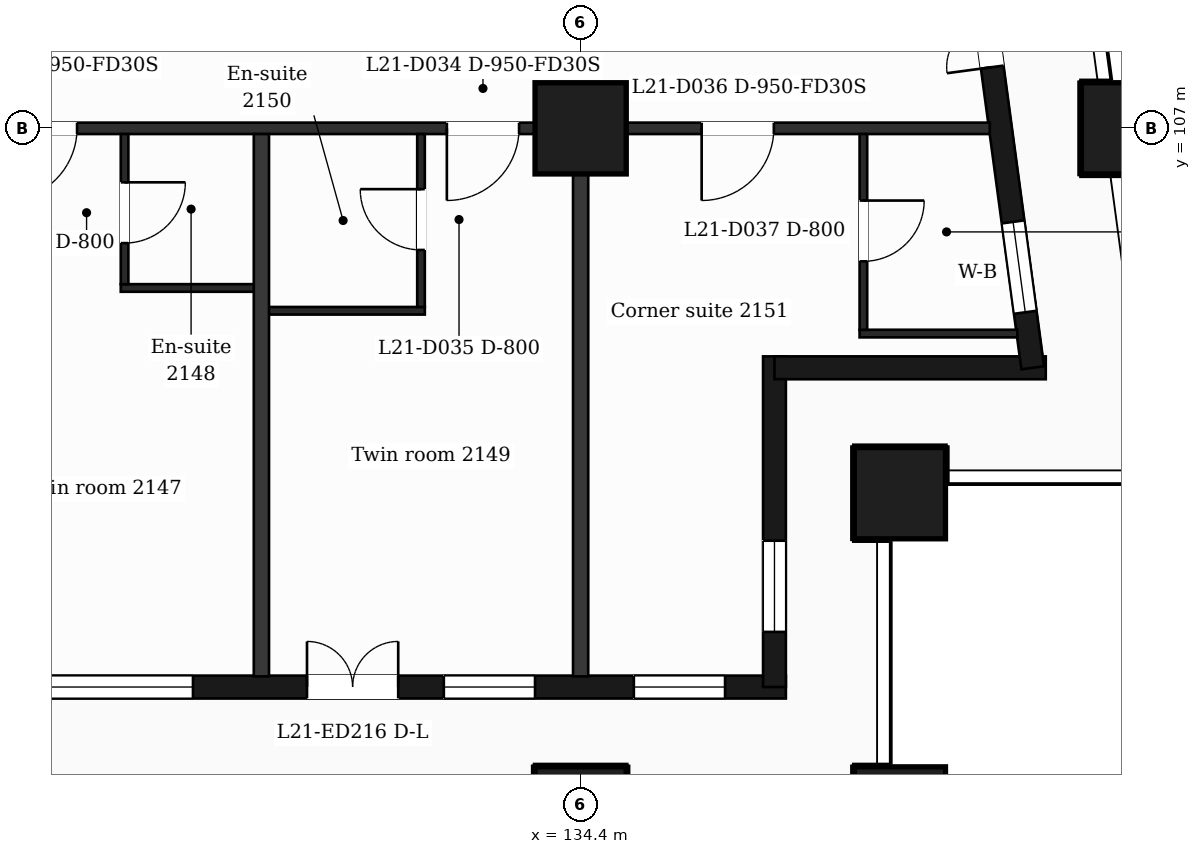
"""IFC4 building model, lengths in metres.
Left out: names, types, materials, properties, quantities, classifications, styles, units other than length and angle.
Written with IfcOpenShell. Run it as: python <this file> out.ifc"""

import sys

from ifc_helpers import new_model, si_unit, direction, frame, frame_2d, origin, origin_2d, place, context, subcontext, project, spatial, rectangle, extrude, element, fill, save


model = new_model("IFC4")
c1 = context("Model", 3, precision=1e-05, world=origin(), true_north=direction((0.0, 1.0)))
c2 = subcontext(c1, "Body", "Model", "MODEL_VIEW")
j1 = project(units=[si_unit("LENGTHUNIT", "METRE"), si_unit("PLANEANGLEUNIT", "RADIAN")], contexts=[c1])
p1 = place(None, origin())
s1 = spatial("IfcSite", under=j1, at=p1, CompositionType="ELEMENT")
p2 = place(p1, origin())
s2 = spatial("IfcBuilding", under=s1, at=p2, CompositionType="ELEMENT")
p3 = place(p2, frame((0.0, 0.0, 94.7)))
s3 = spatial("IfcBuildingStorey", under=s2, at=p3, CompositionType="ELEMENT", Elevation=94.7)
for number, where, z_axis, x_axis in (
    (1, (134.4, 98.0, 0.0), (0.0, 0.0, 1.0), (1.0, 0.0, 0.0)),
    (2, (138.6, 98.0, 0.0), (0.0, 0.0, 1.0), (1.0, 0.0, 0.0)),
    (3, (138.6, 102.2, 0.0), (0.0, 0.0, 1.0), (1.0, 0.0, 0.0)),
    (4, (134.4, 107.0, 0.0), (0.0, 0.0, 1.0), (1.0, 0.0, 0.0)),
    (5, (141.588, 107.0, 0.0), (0.0, 0.0, 1.0), (1.0, 0.0, 0.0)),
):
    element("IfcColumn", number, at=place(p3, frame(where, z_axis=z_axis, x_axis=x_axis)), inside=s3, PredefinedType="COLUMN", context=c2, shape_type="SweptSolid", body=[
        extrude(rectangle(XDim=1.2, YDim=1.2, at=origin_2d()), origin(), (0.0, 0.0, 1.0), 3.7),
    ])
p4 = place(p3, frame((89.85, 99.65, 0.0), z_axis=(0.0, 0.0, 1.0), x_axis=(1.0, 0.0, 0.0)))
e6 = element("IfcWall", 6, at=p4, inside=s3, PredefinedType="SOLIDWALL", context=c2, shape_type="SweptSolid", body=[
    extrude(rectangle(XDim=47.25, YDim=0.3, at=frame_2d((23.625, 0.0))), origin(), (0.0, 0.0, 1.0), 3.38),
])
p5 = place(p4, frame((0.725, 0.0, 0.9)))
e7 = element("IfcOpeningElement", 7, at=p5, cuts=e6, PredefinedType="OPENING", context=c2, shape_type="SweptSolid", body=[
    extrude(rectangle(XDim=1.2, YDim=2.1, at=frame_2d((0.6, 1.05))), frame((0.0, 0.16, 0.0), z_axis=(0.0, -1.0, 0.0), x_axis=(1.0, 0.0, 0.0)), (0.0, 0.0, 1.0), 0.32),
])
p6 = place(p4, frame((3.45, 0.0, 0.9)))
e8 = element("IfcOpeningElement", 8, at=p6, cuts=e6, PredefinedType="OPENING", context=c2, shape_type="SweptSolid", body=[
    extrude(rectangle(XDim=2.4, YDim=2.1, at=frame_2d((1.2, 1.05))), frame((0.0, 0.16, 0.0), z_axis=(0.0, -1.0, 0.0), x_axis=(1.0, 0.0, 0.0)), (0.0, 0.0, 1.0), 0.32),
])
p7 = place(p4, frame((7.65, 0.0, 0.9)))
e9 = element("IfcOpeningElement", 9, at=p7, cuts=e6, PredefinedType="OPENING", context=c2, shape_type="SweptSolid", body=[
    extrude(rectangle(XDim=2.4, YDim=2.1, at=frame_2d((1.2, 1.05))), frame((0.0, 0.16, 0.0), z_axis=(0.0, -1.0, 0.0), x_axis=(1.0, 0.0, 0.0)), (0.0, 0.0, 1.0), 0.32),
])
p8 = place(p4, frame((11.85, 0.0, 0.9)))
e10 = element("IfcOpeningElement", 10, at=p8, cuts=e6, PredefinedType="OPENING", context=c2, shape_type="SweptSolid", body=[
    extrude(rectangle(XDim=2.4, YDim=2.1, at=frame_2d((1.2, 1.05))), frame((0.0, 0.16, 0.0), z_axis=(0.0, -1.0, 0.0), x_axis=(1.0, 0.0, 0.0)), (0.0, 0.0, 1.0), 0.32),
])
p9 = place(p4, frame((16.05, 0.0, 0.9)))
e11 = element("IfcOpeningElement", 11, at=p9, cuts=e6, PredefinedType="OPENING", context=c2, shape_type="SweptSolid", body=[
    extrude(rectangle(XDim=2.4, YDim=2.1, at=frame_2d((1.2, 1.05))), frame((0.0, 0.16, 0.0), z_axis=(0.0, -1.0, 0.0), x_axis=(1.0, 0.0, 0.0)), (0.0, 0.0, 1.0), 0.32),
])
p10 = place(p4, frame((20.25, 0.0, 0.9)))
e12 = element("IfcOpeningElement", 12, at=p10, cuts=e6, PredefinedType="OPENING", context=c2, shape_type="SweptSolid", body=[
    extrude(rectangle(XDim=2.4, YDim=2.1, at=frame_2d((1.2, 1.05))), frame((0.0, 0.16, 0.0), z_axis=(0.0, -1.0, 0.0), x_axis=(1.0, 0.0, 0.0)), (0.0, 0.0, 1.0), 0.32),
])
p11 = place(p4, frame((25.05, 0.0, 0.9)))
e13 = element("IfcOpeningElement", 13, at=p11, cuts=e6, PredefinedType="OPENING", context=c2, shape_type="SweptSolid", body=[
    extrude(rectangle(XDim=1.2, YDim=2.1, at=frame_2d((0.6, 1.05))), frame((0.0, 0.16, 0.0), z_axis=(0.0, -1.0, 0.0), x_axis=(1.0, 0.0, 0.0)), (0.0, 0.0, 1.0), 0.32),
])
p12 = place(p4, frame((29.25, 0.0, 0.9)))
e14 = element("IfcOpeningElement", 14, at=p12, cuts=e6, PredefinedType="OPENING", context=c2, shape_type="SweptSolid", body=[
    extrude(rectangle(XDim=1.2, YDim=2.1, at=frame_2d((0.6, 1.05))), frame((0.0, 0.16, 0.0), z_axis=(0.0, -1.0, 0.0), x_axis=(1.0, 0.0, 0.0)), (0.0, 0.0, 1.0), 0.32),
])
p13 = place(p4, frame((32.55, 0.0, 0.0)))
e15 = element("IfcOpeningElement", 15, at=p13, cuts=e6, PredefinedType="OPENING", context=c2, shape_type="SweptSolid", body=[
    extrude(rectangle(XDim=1.2, YDim=2.4, at=frame_2d((0.6, 1.2))), frame((0.0, 0.16, 0.0), z_axis=(0.0, -1.0, 0.0), x_axis=(1.0, 0.0, 0.0)), (0.0, 0.0, 1.0), 0.32),
])
p14 = place(p4, frame((34.35, 0.0, 0.9)))
e16 = element("IfcOpeningElement", 16, at=p14, cuts=e6, PredefinedType="OPENING", context=c2, shape_type="SweptSolid", body=[
    extrude(rectangle(XDim=1.2, YDim=2.1, at=frame_2d((0.6, 1.05))), frame((0.0, 0.16, 0.0), z_axis=(0.0, -1.0, 0.0), x_axis=(1.0, 0.0, 0.0)), (0.0, 0.0, 1.0), 0.32),
])
p15 = place(p4, frame((37.05, 0.0, 0.9)))
e17 = element("IfcOpeningElement", 17, at=p15, cuts=e6, PredefinedType="OPENING", context=c2, shape_type="SweptSolid", body=[
    extrude(rectangle(XDim=2.4, YDim=2.1, at=frame_2d((1.2, 1.05))), frame((0.0, 0.16, 0.0), z_axis=(0.0, -1.0, 0.0), x_axis=(1.0, 0.0, 0.0)), (0.0, 0.0, 1.0), 0.32),
])
p16 = place(p4, frame((40.95, 0.0, 0.0)))
e18 = element("IfcOpeningElement", 18, at=p16, cuts=e6, PredefinedType="OPENING", context=c2, shape_type="SweptSolid", body=[
    extrude(rectangle(XDim=1.2, YDim=2.4, at=frame_2d((0.6, 1.2))), frame((0.0, 0.16, 0.0), z_axis=(0.0, -1.0, 0.0), x_axis=(1.0, 0.0, 0.0)), (0.0, 0.0, 1.0), 0.32),
])
p17 = place(p4, frame((42.75, 0.0, 0.9)))
e19 = element("IfcOpeningElement", 19, at=p17, cuts=e6, PredefinedType="OPENING", context=c2, shape_type="SweptSolid", body=[
    extrude(rectangle(XDim=1.2, YDim=2.1, at=frame_2d((0.6, 1.05))), frame((0.0, 0.16, 0.0), z_axis=(0.0, -1.0, 0.0), x_axis=(1.0, 0.0, 0.0)), (0.0, 0.0, 1.0), 0.32),
])
p18 = place(p4, frame((45.25, 0.0, 0.9)))
e20 = element("IfcOpeningElement", 20, at=p18, cuts=e6, PredefinedType="OPENING", context=c2, shape_type="SweptSolid", body=[
    extrude(rectangle(XDim=1.2, YDim=2.1, at=frame_2d((0.6, 1.05))), frame((0.0, 0.16, 0.0), z_axis=(0.0, -1.0, 0.0), x_axis=(1.0, 0.0, 0.0)), (0.0, 0.0, 1.0), 0.32),
])
p19 = place(p3, frame((136.95, 99.65, 0.0), z_axis=(0.0, 0.0, 1.0), x_axis=(0.0, 1.0, 0.0)))
e21 = element("IfcWall", 21, at=p19, inside=s3, PredefinedType="SOLIDWALL", context=c2, shape_type="SweptSolid", body=[
    extrude(rectangle(XDim=4.35, YDim=0.3, at=frame_2d((2.175, 0.0))), origin(), (0.0, 0.0, 1.0), 3.38),
])
p20 = place(p19, frame((0.725, 0.0, 0.9)))
e22 = element("IfcOpeningElement", 22, at=p20, cuts=e21, PredefinedType="OPENING", context=c2, shape_type="SweptSolid", body=[
    extrude(rectangle(XDim=1.2, YDim=2.1, at=frame_2d((0.6, 1.05))), frame((0.0, 0.16, 0.0), z_axis=(0.0, -1.0, 0.0), x_axis=(1.0, 0.0, 0.0)), (0.0, 0.0, 1.0), 0.32),
])
p21 = place(p3, frame((136.95, 103.85, 0.0), z_axis=(0.0, 0.0, 1.0), x_axis=(1.0, 0.0, 0.0)))
e23 = element("IfcWall", 23, at=p21, inside=s3, PredefinedType="SOLIDWALL", context=c2, shape_type="SweptSolid", body=[
    extrude(rectangle(XDim=3.569, YDim=0.3, at=frame_2d((1.785, 0.0))), origin(), (0.0, 0.0, 1.0), 3.38),
])
p22 = place(p3, frame((140.348, 103.85, 0.0), z_axis=(0.0, 0.0, 1.0), x_axis=(-0.133431549479, 0.991058031401, 0.0)))
e24 = element("IfcWall", 24, at=p22, inside=s3, PredefinedType="SOLIDWALL", context=c2, shape_type="SweptSolid", body=[
    extrude(rectangle(XDim=6.609, YDim=0.3, at=frame_2d((3.304, 0.0))), origin(), (0.0, 0.0, 1.0), 3.38),
])
p23 = place(p22, frame((0.737, 0.0, 0.9)))
e25 = element("IfcOpeningElement", 25, at=p23, cuts=e24, PredefinedType="OPENING", context=c2, shape_type="SweptSolid", body=[
    extrude(rectangle(XDim=1.2, YDim=2.1, at=frame_2d((0.6, 1.05))), frame((0.0, 0.16, 0.0), z_axis=(0.0, -1.0, 0.0), x_axis=(1.0, 0.0, 0.0)), (0.0, 0.0, 1.0), 0.32),
])
p24 = place(p22, frame((3.991, 0.0, 0.0)))
e26 = element("IfcOpeningElement", 26, at=p24, cuts=e24, PredefinedType="OPENING", context=c2, shape_type="SweptSolid", body=[
    extrude(rectangle(XDim=1.2, YDim=2.4, at=frame_2d((0.6, 1.2))), frame((0.0, 0.16, 0.0), z_axis=(0.0, -1.0, 0.0), x_axis=(1.0, 0.0, 0.0)), (0.0, 0.0, 1.0), 0.32),
])
p25 = place(p3, frame((138.07, 104.3, 0.0), z_axis=(0.0, 0.0, 1.0), x_axis=(1.0, 0.0, 0.0)))
e27 = element("IfcWall", 27, at=p25, inside=s3, PredefinedType="PARTITIONING", context=c2, shape_type="SweptSolid", body=[
    extrude(rectangle(XDim=2.076, YDim=0.1, at=frame_2d((1.038, 0.0))), origin(), (0.0, 0.0, 1.0), 3.38),
])
p26 = place(p3, frame((130.2, 104.6, 0.0), z_axis=(0.0, 0.0, 1.0), x_axis=(1.0, 0.0, 0.0)))
e28 = element("IfcWall", 28, at=p26, inside=s3, PredefinedType="PARTITIONING", context=c2, shape_type="SweptSolid", body=[
    extrude(rectangle(XDim=2.15, YDim=0.1, at=frame_2d((1.075, 0.0))), origin(), (0.0, 0.0, 1.0), 3.38),
])
p27 = place(p3, frame((128.35, 104.9, 0.0), z_axis=(0.0, 0.0, 1.0), x_axis=(1.0, 0.0, 0.0)))
e29 = element("IfcWall", 29, at=p27, inside=s3, PredefinedType="PARTITIONING", context=c2, shape_type="SweptSolid", body=[
    extrude(rectangle(XDim=1.85, YDim=0.1, at=frame_2d((0.925, 0.0))), origin(), (0.0, 0.0, 1.0), 3.38),
])
p28 = place(p3, frame((87.018, 107.0, 0.0), z_axis=(0.0, 0.0, 1.0), x_axis=(1.0, 0.0, 0.0)))
e30 = element("IfcWall", 30, at=p28, inside=s3, PredefinedType="PARTITIONING", context=c2, shape_type="SweptSolid", body=[
    extrude(rectangle(XDim=52.765, YDim=0.15, at=frame_2d((26.382, 0.0))), origin(), (0.0, 0.0, 1.0), 3.38),
])
p29 = place(p28, frame((0.707, 0.0, 0.0)))
e31 = element("IfcOpeningElement", 31, at=p29, cuts=e30, PredefinedType="OPENING", context=c2, shape_type="SweptSolid", body=[
    extrude(rectangle(XDim=0.95, YDim=2.1, at=frame_2d((0.475, 1.05))), frame((0.0, 0.085, 0.0), z_axis=(0.0, -1.0, 0.0), x_axis=(1.0, 0.0, 0.0)), (0.0, 0.0, 1.0), 0.17),
])
p30 = place(p28, frame((6.982, 0.0, 0.0)))
e32 = element("IfcOpeningElement", 32, at=p30, cuts=e30, PredefinedType="OPENING", context=c2, shape_type="SweptSolid", body=[
    extrude(rectangle(XDim=1.0, YDim=2.1, at=frame_2d((0.5, 1.05))), frame((0.0, 0.085, 0.0), z_axis=(0.0, -1.0, 0.0), x_axis=(1.0, 0.0, 0.0)), (0.0, 0.0, 1.0), 0.17),
])
p31 = place(p28, frame((16.457, 0.0, 0.0)))
e33 = element("IfcOpeningElement", 33, at=p31, cuts=e30, PredefinedType="OPENING", context=c2, shape_type="SweptSolid", body=[
    extrude(rectangle(XDim=0.95, YDim=2.1, at=frame_2d((0.475, 1.05))), frame((0.0, 0.085, 0.0), z_axis=(0.0, -1.0, 0.0), x_axis=(1.0, 0.0, 0.0)), (0.0, 0.0, 1.0), 0.17),
])
p32 = place(p28, frame((18.445, 0.0, 0.0)))
e34 = element("IfcOpeningElement", 34, at=p32, cuts=e30, PredefinedType="OPENING", context=c2, shape_type="SweptSolid", body=[
    extrude(rectangle(XDim=0.95, YDim=2.1, at=frame_2d((0.475, 1.05))), frame((0.0, 0.085, 0.0), z_axis=(0.0, -1.0, 0.0), x_axis=(1.0, 0.0, 0.0)), (0.0, 0.0, 1.0), 0.17),
])
p33 = place(p28, frame((25.157, 0.0, 0.0)))
e35 = element("IfcOpeningElement", 35, at=p33, cuts=e30, PredefinedType="OPENING", context=c2, shape_type="SweptSolid", body=[
    extrude(rectangle(XDim=0.95, YDim=2.1, at=frame_2d((0.475, 1.05))), frame((0.0, 0.085, 0.0), z_axis=(0.0, -1.0, 0.0), x_axis=(1.0, 0.0, 0.0)), (0.0, 0.0, 1.0), 0.17),
])
p34 = place(p28, frame((27.07, 0.0, 0.0)))
e36 = element("IfcOpeningElement", 36, at=p34, cuts=e30, PredefinedType="OPENING", context=c2, shape_type="SweptSolid", body=[
    extrude(rectangle(XDim=0.95, YDim=2.1, at=frame_2d((0.475, 1.05))), frame((0.0, 0.085, 0.0), z_axis=(0.0, -1.0, 0.0), x_axis=(1.0, 0.0, 0.0)), (0.0, 0.0, 1.0), 0.17),
])
p35 = place(p28, frame((34.712, 0.0, 0.0)))
e37 = element("IfcOpeningElement", 37, at=p35, cuts=e30, PredefinedType="OPENING", context=c2, shape_type="SweptSolid", body=[
    extrude(rectangle(XDim=0.95, YDim=2.1, at=frame_2d((0.475, 1.05))), frame((0.0, 0.085, 0.0), z_axis=(0.0, -1.0, 0.0), x_axis=(1.0, 0.0, 0.0)), (0.0, 0.0, 1.0), 0.17),
])
p36 = place(p28, frame((39.807, 0.0, 0.0)))
e38 = element("IfcOpeningElement", 38, at=p36, cuts=e30, PredefinedType="OPENING", context=c2, shape_type="SweptSolid", body=[
    extrude(rectangle(XDim=0.95, YDim=2.1, at=frame_2d((0.475, 1.05))), frame((0.0, 0.085, 0.0), z_axis=(0.0, -1.0, 0.0), x_axis=(1.0, 0.0, 0.0)), (0.0, 0.0, 1.0), 0.17),
])
p37 = place(p28, frame((45.622, 0.0, 0.0)))
e39 = element("IfcOpeningElement", 39, at=p37, cuts=e30, PredefinedType="OPENING", context=c2, shape_type="SweptSolid", body=[
    extrude(rectangle(XDim=0.95, YDim=2.1, at=frame_2d((0.475, 1.05))), frame((0.0, 0.085, 0.0), z_axis=(0.0, -1.0, 0.0), x_axis=(1.0, 0.0, 0.0)), (0.0, 0.0, 1.0), 0.17),
])
p38 = place(p28, frame((48.974, 0.0, 0.0)))
e40 = element("IfcOpeningElement", 40, at=p38, cuts=e30, PredefinedType="OPENING", context=c2, shape_type="SweptSolid", body=[
    extrude(rectangle(XDim=0.95, YDim=2.1, at=frame_2d((0.475, 1.05))), frame((0.0, 0.085, 0.0), z_axis=(0.0, -1.0, 0.0), x_axis=(1.0, 0.0, 0.0)), (0.0, 0.0, 1.0), 0.17),
])
p39 = place(p3, frame((128.4, 104.95, 0.0), z_axis=(0.0, 0.0, 1.0), x_axis=(0.0, 1.0, 0.0)))
e41 = element("IfcWall", 41, at=p39, inside=s3, PredefinedType="PARTITIONING", context=c2, shape_type="SweptSolid", body=[
    extrude(rectangle(XDim=1.975, YDim=0.1, at=frame_2d((0.988, 0.0))), origin(), (0.0, 0.0, 1.0), 3.38),
])
p40 = place(p39, frame((0.54, 0.0, 0.0)))
e42 = element("IfcOpeningElement", 42, at=p40, cuts=e41, PredefinedType="OPENING", context=c2, shape_type="SweptSolid", body=[
    extrude(rectangle(XDim=0.8, YDim=2.1, at=frame_2d((0.4, 1.05))), frame((0.0, 0.06, 0.0), z_axis=(0.0, -1.0, 0.0), x_axis=(1.0, 0.0, 0.0)), (0.0, 0.0, 1.0), 0.12),
])
p41 = place(p3, frame((130.2, 99.79, 0.0), z_axis=(0.0, 0.0, 1.0), x_axis=(0.0, 1.0, 0.0)))
e43 = element("IfcWall", 43, at=p41, inside=s3, PredefinedType="PARTITIONING", context=c2, shape_type="SweptSolid", body=[
    extrude(rectangle(XDim=7.135, YDim=0.2, at=frame_2d((3.567, 0.0))), origin(), (0.0, 0.0, 1.0), 3.38),
])
p42 = place(p3, frame((132.3, 104.65, 0.0), z_axis=(0.0, 0.0, 1.0), x_axis=(0.0, 1.0, 0.0)))
e44 = element("IfcWall", 44, at=p42, inside=s3, PredefinedType="PARTITIONING", context=c2, shape_type="SweptSolid", body=[
    extrude(rectangle(XDim=2.275, YDim=0.1, at=frame_2d((1.138, 0.0))), origin(), (0.0, 0.0, 1.0), 3.38),
])
p43 = place(p42, frame((0.75, 0.0, 0.0)))
e45 = element("IfcOpeningElement", 45, at=p43, cuts=e44, PredefinedType="OPENING", context=c2, shape_type="SweptSolid", body=[
    extrude(rectangle(XDim=0.8, YDim=2.1, at=frame_2d((0.4, 1.05))), frame((0.0, 0.06, 0.0), z_axis=(0.0, -1.0, 0.0), x_axis=(1.0, 0.0, 0.0)), (0.0, 0.0, 1.0), 0.12),
])
p44 = place(p3, frame((134.4, 99.79, 0.0), z_axis=(0.0, 0.0, 1.0), x_axis=(0.0, 1.0, 0.0)))
e46 = element("IfcWall", 46, at=p44, inside=s3, PredefinedType="PARTITIONING", context=c2, shape_type="SweptSolid", body=[
    extrude(rectangle(XDim=7.135, YDim=0.2, at=frame_2d((3.567, 0.0))), origin(), (0.0, 0.0, 1.0), 3.38),
])
p45 = place(p3, frame((138.12, 104.35, 0.0), z_axis=(0.0, 0.0, 1.0), x_axis=(0.0, 1.0, 0.0)))
e47 = element("IfcWall", 47, at=p45, inside=s3, PredefinedType="PARTITIONING", context=c2, shape_type="SweptSolid", body=[
    extrude(rectangle(XDim=2.575, YDim=0.1, at=frame_2d((1.288, 0.0))), origin(), (0.0, 0.0, 1.0), 3.38),
])
p46 = place(p45, frame((0.9, 0.0, 0.0)))
e48 = element("IfcOpeningElement", 48, at=p46, cuts=e47, PredefinedType="OPENING", context=c2, shape_type="SweptSolid", body=[
    extrude(rectangle(XDim=0.8, YDim=2.1, at=frame_2d((0.4, 1.05))), frame((0.0, 0.06, 0.0), z_axis=(0.0, -1.0, 0.0), x_axis=(1.0, 0.0, 0.0)), (0.0, 0.0, 1.0), 0.12),
])
p47 = place(p15, origin())
e49 = element("IfcWindow", 49, at=p47, inside=s3, PartitioningType="SINGLE_PANEL", PredefinedType="WINDOW", context=c2, shape_type="SweptSolid", body=[
    extrude(rectangle(XDim=2.4, YDim=2.1, at=frame_2d((1.2, 1.05))), frame((0.0, 0.03, 0.0), z_axis=(0.0, -1.0, 0.0), x_axis=(1.0, 0.0, 0.0)), (0.0, 0.0, 1.0), 0.06),
])
fill(e17, e49)
p48 = place(p16, origin())
e50 = element("IfcDoor", 50, at=p48, inside=s3, OperationType="DOUBLE_DOOR_SINGLE_SWING", PredefinedType="DOOR", context=c2, shape_type="SweptSolid", body=[
    extrude(rectangle(XDim=1.2, YDim=2.4, at=frame_2d((0.6, 1.2))), frame((0.0, 0.025, 0.0), z_axis=(0.0, -1.0, 0.0), x_axis=(1.0, 0.0, 0.0)), (0.0, 0.0, 1.0), 0.05),
])
fill(e18, e50)
p49 = place(p17, origin())
e51 = element("IfcWindow", 51, at=p49, inside=s3, PartitioningType="SINGLE_PANEL", PredefinedType="WINDOW", context=c2, shape_type="SweptSolid", body=[
    extrude(rectangle(XDim=1.2, YDim=2.1, at=frame_2d((0.6, 1.05))), frame((0.0, 0.03, 0.0), z_axis=(0.0, -1.0, 0.0), x_axis=(1.0, 0.0, 0.0)), (0.0, 0.0, 1.0), 0.06),
])
fill(e19, e51)
p50 = place(p18, origin())
e52 = element("IfcWindow", 52, at=p50, inside=s3, PartitioningType="SINGLE_PANEL", PredefinedType="WINDOW", context=c2, shape_type="SweptSolid", body=[
    extrude(rectangle(XDim=1.2, YDim=2.1, at=frame_2d((0.6, 1.05))), frame((0.0, 0.03, 0.0), z_axis=(0.0, -1.0, 0.0), x_axis=(1.0, 0.0, 0.0)), (0.0, 0.0, 1.0), 0.06),
])
fill(e20, e52)
p51 = place(p20, origin())
e53 = element("IfcWindow", 53, at=p51, inside=s3, PartitioningType="SINGLE_PANEL", PredefinedType="WINDOW", context=c2, shape_type="SweptSolid", body=[
    extrude(rectangle(XDim=1.2, YDim=2.1, at=frame_2d((0.6, 1.05))), frame((0.0, 0.03, 0.0), z_axis=(0.0, -1.0, 0.0), x_axis=(1.0, 0.0, 0.0)), (0.0, 0.0, 1.0), 0.06),
])
fill(e22, e53)
p52 = place(p23, origin())
e54 = element("IfcWindow", 54, at=p52, inside=s3, PartitioningType="SINGLE_PANEL", PredefinedType="WINDOW", context=c2, shape_type="SweptSolid", body=[
    extrude(rectangle(XDim=1.2, YDim=2.1, at=frame_2d((0.6, 1.05))), frame((0.0, 0.03, 0.0), z_axis=(0.0, -1.0, 0.0), x_axis=(1.0, 0.0, 0.0)), (0.0, 0.0, 1.0), 0.06),
])
fill(e25, e54)
p53 = place(p24, origin())
e55 = element("IfcDoor", 55, at=p53, inside=s3, OperationType="DOUBLE_DOOR_SINGLE_SWING", PredefinedType="DOOR", context=c2, shape_type="SweptSolid", body=[
    extrude(rectangle(XDim=1.2, YDim=2.4, at=frame_2d((0.6, 1.2))), frame((0.0, 0.025, 0.0), z_axis=(0.0, -1.0, 0.0), x_axis=(1.0, 0.0, 0.0)), (0.0, 0.0, 1.0), 0.05),
])
fill(e26, e55)
p54 = place(p36, origin())
e56 = element("IfcDoor", 56, at=p54, inside=s3, OperationType="SINGLE_SWING_LEFT", PredefinedType="DOOR", context=c2, shape_type="SweptSolid", body=[
    extrude(rectangle(XDim=0.95, YDim=2.1, at=frame_2d((0.475, 1.05))), frame((0.0, 0.025, 0.0), z_axis=(0.0, -1.0, 0.0), x_axis=(1.0, 0.0, 0.0)), (0.0, 0.0, 1.0), 0.05),
])
fill(e38, e56)
p55 = place(p40, origin())
e57 = element("IfcDoor", 57, at=p55, inside=s3, OperationType="SINGLE_SWING_RIGHT", PredefinedType="DOOR", context=c2, shape_type="SweptSolid", body=[
    extrude(rectangle(XDim=0.8, YDim=2.1, at=frame_2d((0.4, 1.05))), frame((0.0, 0.025, 0.0), z_axis=(0.0, -1.0, 0.0), x_axis=(1.0, 0.0, 0.0)), (0.0, 0.0, 1.0), 0.05),
])
fill(e42, e57)
p56 = place(p37, origin())
e58 = element("IfcDoor", 58, at=p56, inside=s3, OperationType="SINGLE_SWING_LEFT", PredefinedType="DOOR", context=c2, shape_type="SweptSolid", body=[
    extrude(rectangle(XDim=0.95, YDim=2.1, at=frame_2d((0.475, 1.05))), frame((0.0, 0.025, 0.0), z_axis=(0.0, -1.0, 0.0), x_axis=(1.0, 0.0, 0.0)), (0.0, 0.0, 1.0), 0.05),
])
fill(e39, e58)
p57 = place(p43, origin())
e59 = element("IfcDoor", 59, at=p57, inside=s3, OperationType="SINGLE_SWING_RIGHT", PredefinedType="DOOR", context=c2, shape_type="SweptSolid", body=[
    extrude(rectangle(XDim=0.8, YDim=2.1, at=frame_2d((0.4, 1.05))), frame((0.0, 0.025, 0.0), z_axis=(0.0, -1.0, 0.0), x_axis=(1.0, 0.0, 0.0)), (0.0, 0.0, 1.0), 0.05),
])
fill(e45, e59)
p58 = place(p38, origin())
e60 = element("IfcDoor", 60, at=p58, inside=s3, OperationType="SINGLE_SWING_LEFT", PredefinedType="DOOR", context=c2, shape_type="SweptSolid", body=[
    extrude(rectangle(XDim=0.95, YDim=2.1, at=frame_2d((0.475, 1.05))), frame((0.0, 0.025, 0.0), z_axis=(0.0, -1.0, 0.0), x_axis=(1.0, 0.0, 0.0)), (0.0, 0.0, 1.0), 0.05),
])
fill(e40, e60)
p59 = place(p46, origin())
e61 = element("IfcDoor", 61, at=p59, inside=s3, OperationType="SINGLE_SWING_RIGHT", PredefinedType="DOOR", context=c2, shape_type="SweptSolid", body=[
    extrude(rectangle(XDim=0.8, YDim=2.1, at=frame_2d((0.4, 1.05))), frame((0.0, 0.025, 0.0), z_axis=(0.0, -1.0, 0.0), x_axis=(1.0, 0.0, 0.0)), (0.0, 0.0, 1.0), 0.05),
])
fill(e48, e61)
save(model, sys.argv[1])
